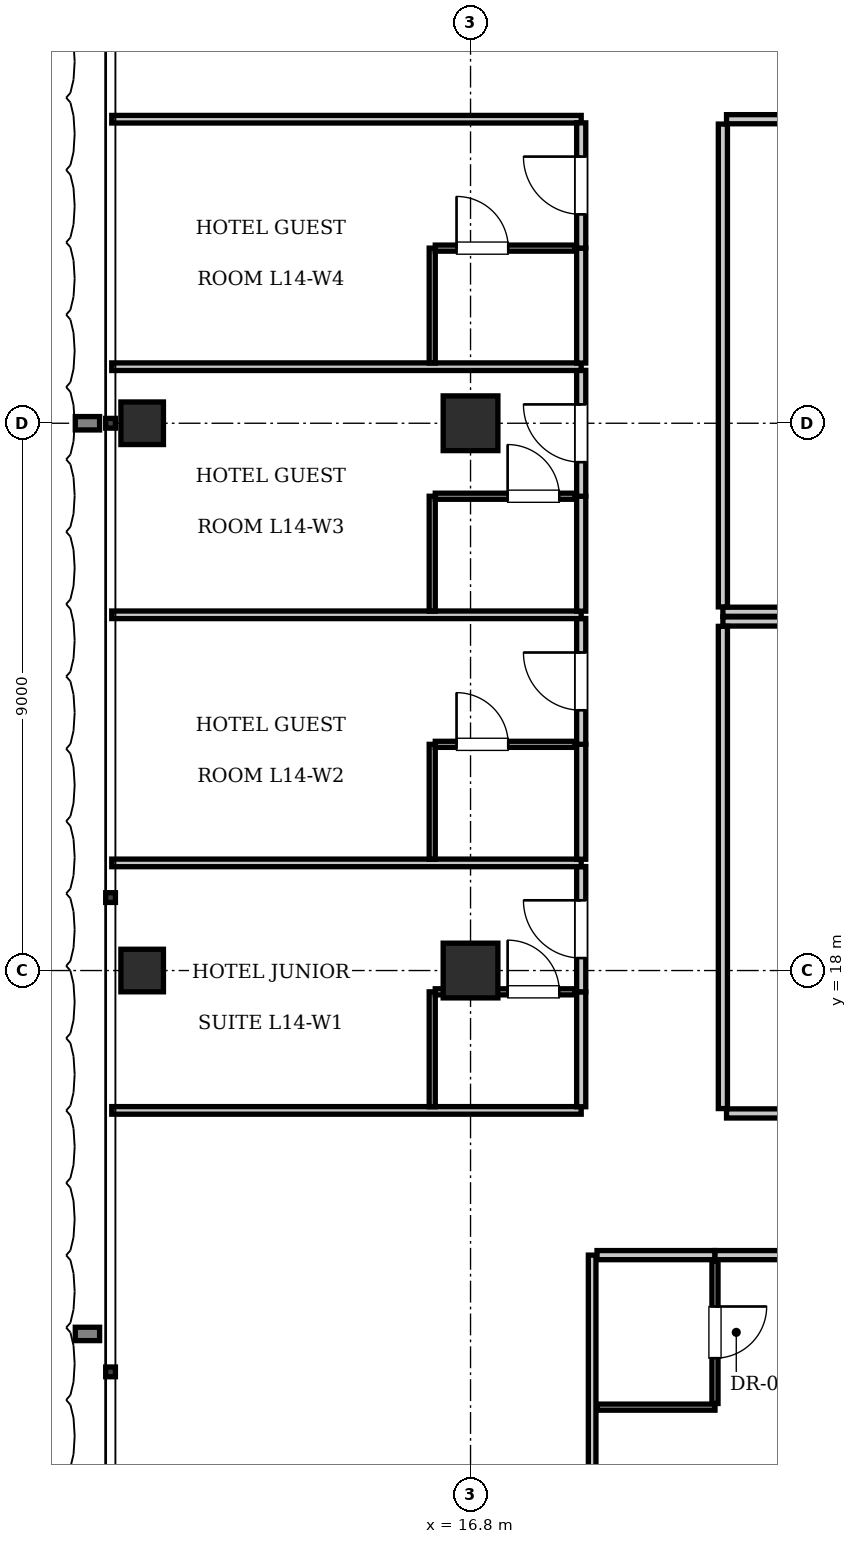
"""IFC4 building model, lengths in metres.
Left out: names, types, materials, properties, quantities, classifications, styles, units other than length and angle.
Written with IfcOpenShell. Run it as: python <this file> out.ifc"""

import sys

from ifc_helpers import new_model, si_unit, direction, frame, frame_2d, origin, origin_2d, place, context, subcontext, project, spatial, rectangle, i_section, extrude, element, fill, save


model = new_model("IFC4")
c1 = context("Model", 3, precision=1e-05, world=origin(), true_north=direction((0.0, 1.0)))
c2 = subcontext(c1, "Body", "Model", "MODEL_VIEW")
j1 = project(units=[si_unit("LENGTHUNIT", "METRE"), si_unit("PLANEANGLEUNIT", "RADIAN")], contexts=[c1])
p1 = place(None, origin())
s1 = spatial("IfcSite", under=j1, at=p1, CompositionType="ELEMENT")
p2 = place(p1, origin())
s2 = spatial("IfcBuilding", under=s1, at=p2, CompositionType="ELEMENT")
p3 = place(p2, frame((0.0, 0.0, 61.6)))
s3 = spatial("IfcBuildingStorey", under=s2, at=p3, CompositionType="ELEMENT", Elevation=61.6)
for number, where, z_axis, x_axis in (
    (1, (16.8, 18.0, 0.0), (0.0, 0.0, 1.0), (1.0, 0.0, 0.0)),
    (2, (16.8, 27.0, 0.0), (0.0, 0.0, 1.0), (1.0, 0.0, 0.0)),
):
    element("IfcColumn", number, at=place(p3, frame(where, z_axis=z_axis, x_axis=x_axis)), inside=s3, PredefinedType="COLUMN", context=c2, shape_type="SweptSolid", body=[
        extrude(rectangle(XDim=0.9, YDim=0.9, at=origin_2d()), origin(), (0.0, 0.0, 1.0), 3.85),
    ])
for number, where, z_axis, x_axis in (
    (3, (11.4, 18.0, 0.0), (0.0, 0.0, 1.0), (1.0, 0.0, 0.0)),
    (4, (11.4, 27.0, 0.0), (0.0, 0.0, 1.0), (1.0, 0.0, 0.0)),
):
    element("IfcColumn", number, at=place(p3, frame(where, z_axis=z_axis, x_axis=x_axis)), inside=s3, PredefinedType="COLUMN", context=c2, shape_type="SweptSolid", body=[
        extrude(i_section(OverallWidth=0.7, OverallDepth=0.7, WebThickness=0.028, FlangeThickness=0.044, at=origin_2d()), origin(), (0.0, 0.0, 1.0), 3.85),
    ])
p4 = place(p3, frame((20.95, 23.9, 0.0), z_axis=(0.0, 0.0, 1.0), x_axis=(1.0, 0.0, 0.0)))
e5 = element("IfcWall", 5, at=p4, inside=s3, PredefinedType="PARTITIONING", context=c2, shape_type="SweptSolid", body=[
    extrude(rectangle(XDim=33.7, YDim=0.15, at=frame_2d((16.85, 0.0))), origin(), (0.0, 0.0, 1.0), 3.61),
])
p5 = place(p3, frame((20.95, 23.98, 0.0), z_axis=(0.0, 0.0, 1.0), x_axis=(0.0, 1.0, 0.0)))
e6 = element("IfcWall", 6, at=p5, inside=s3, PredefinedType="PARTITIONING", context=c2, shape_type="SweptSolid", body=[
    extrude(rectangle(XDim=7.94, YDim=0.15, at=frame_2d((3.97, 0.0))), origin(), (0.0, 0.0, 1.0), 3.255),
])
p6 = place(p3, frame((21.01, 32.0, 0.0), z_axis=(0.0, 0.0, 1.0), x_axis=(1.0, 0.0, 0.0)))
e7 = element("IfcWall", 7, at=p6, inside=s3, PredefinedType="PARTITIONING", context=c2, shape_type="SweptSolid", body=[
    extrude(rectangle(XDim=5.302, YDim=0.15, at=frame_2d((2.651, 0.0))), origin(), (0.0, 0.0, 1.0), 3.61),
])
p7 = place(p6, frame((2.201, 0.0, 0.0)))
e8 = element("IfcOpeningElement", 8, at=p7, cuts=e7, PredefinedType="OPENING", context=c2, shape_type="SweptSolid", body=[
    extrude(rectangle(XDim=0.9, YDim=2.1, at=frame_2d((0.45, 1.05))), frame((0.0, 0.085, 0.0), z_axis=(0.0, -1.0, 0.0), x_axis=(1.0, 0.0, 0.0)), (0.0, 0.0, 1.0), 0.17),
])
p8 = place(p3, frame((20.95, 23.74, 0.0), z_axis=(0.0, 0.0, 1.0), x_axis=(1.0, 0.0, 0.0)))
e9 = element("IfcWall", 9, at=p8, inside=s3, PredefinedType="PARTITIONING", context=c2, shape_type="SweptSolid", body=[
    extrude(rectangle(XDim=33.7, YDim=0.15, at=frame_2d((16.85, 0.0))), origin(), (0.0, 0.0, 1.0), 3.61),
])
p9 = place(p3, frame((20.95, 15.73, 0.0), z_axis=(0.0, 0.0, 1.0), x_axis=(0.0, 1.0, 0.0)))
e10 = element("IfcWall", 10, at=p9, inside=s3, PredefinedType="PARTITIONING", context=c2, shape_type="SweptSolid", body=[
    extrude(rectangle(XDim=7.93, YDim=0.15, at=frame_2d((3.965, 0.0))), origin(), (0.0, 0.0, 1.0), 3.255),
])
p10 = place(p3, frame((21.01, 15.65, 0.0), z_axis=(0.0, 0.0, 1.0), x_axis=(1.0, 0.0, 0.0)))
e11 = element("IfcWall", 11, at=p10, inside=s3, PredefinedType="PARTITIONING", context=c2, shape_type="SweptSolid", body=[
    extrude(rectangle(XDim=7.661, YDim=0.15, at=frame_2d((3.831, 0.0))), origin(), (0.0, 0.0, 1.0), 3.61),
])
p11 = place(p10, frame((3.381, 0.0, 0.0)))
e12 = element("IfcOpeningElement", 12, at=p11, cuts=e11, PredefinedType="OPENING", context=c2, shape_type="SweptSolid", body=[
    extrude(rectangle(XDim=0.9, YDim=2.1, at=frame_2d((0.45, 1.05))), frame((0.0, 0.085, 0.0), z_axis=(0.0, -1.0, 0.0), x_axis=(1.0, 0.0, 0.0)), (0.0, 0.0, 1.0), 0.17),
])
p12 = place(p3, frame((18.8, 0.1, 0.0), z_axis=(0.0, 0.0, 1.0), x_axis=(0.0, 1.0, 0.0)))
e13 = element("IfcWall", 13, at=p12, inside=s3, PredefinedType="PARTITIONING", context=c2, shape_type="SweptSolid", body=[
    extrude(rectangle(XDim=13.22, YDim=0.125, at=frame_2d((6.61, 0.0))), origin(), (0.0, 0.0, 1.0), 3.61),
])
p13 = place(p3, frame((18.88, 13.32, 0.0), z_axis=(0.0, 0.0, 1.0), x_axis=(1.0, 0.0, 0.0)))
e14 = element("IfcWall", 14, at=p13, inside=s3, PredefinedType="PARTITIONING", context=c2, shape_type="SweptSolid", body=[
    extrude(rectangle(XDim=1.94, YDim=0.15, at=frame_2d((0.97, 0.0))), origin(), (0.0, 0.0, 1.0), 3.61),
])
p14 = place(p3, frame((18.88, 10.82, 0.0), z_axis=(0.0, 0.0, 1.0), x_axis=(1.0, 0.0, 0.0)))
e15 = element("IfcWall", 15, at=p14, inside=s3, PredefinedType="PARTITIONING", context=c2, shape_type="SweptSolid", body=[
    extrude(rectangle(XDim=1.94, YDim=0.1, at=frame_2d((0.97, 0.0))), origin(), (0.0, 0.0, 1.0), 3.61),
])
p15 = place(p3, frame((20.82, 10.88, 0.0), z_axis=(0.0, 0.0, 1.0), x_axis=(0.0, 1.0, 0.0)))
e16 = element("IfcWall", 16, at=p15, inside=s3, PredefinedType="PARTITIONING", context=c2, shape_type="SweptSolid", body=[
    extrude(rectangle(XDim=2.34, YDim=0.1, at=frame_2d((1.17, 0.0))), origin(), (0.0, 0.0, 1.0), 3.61),
])
p16 = place(p15, frame((0.745, 0.0, 0.0)))
e17 = element("IfcOpeningElement", 17, at=p16, cuts=e16, PredefinedType="OPENING", context=c2, shape_type="SweptSolid", body=[
    extrude(rectangle(XDim=0.85, YDim=2.1, at=frame_2d((0.425, 1.05))), frame((0.0, 0.06, 0.0), z_axis=(0.0, -1.0, 0.0), x_axis=(1.0, 0.0, 0.0)), (0.0, 0.0, 1.0), 0.12),
])
p17 = place(p3, frame((20.82, 13.32, 0.0), z_axis=(0.0, 0.0, 1.0), x_axis=(1.0, 0.0, 0.0)))
e18 = element("IfcWall", 18, at=p17, inside=s3, PredefinedType="PARTITIONING", context=c2, shape_type="SweptSolid", body=[
    extrude(rectangle(XDim=3.56, YDim=0.15, at=frame_2d((1.78, 0.0))), origin(), (0.0, 0.0, 1.0), 3.61),
])
p18 = place(p17, frame((1.305, 0.0, 0.0)))
e19 = element("IfcOpeningElement", 19, at=p18, cuts=e18, PredefinedType="OPENING", context=c2, shape_type="SweptSolid", body=[
    extrude(rectangle(XDim=0.95, YDim=2.15, at=frame_2d((0.475, 1.075))), frame((0.0, 0.085, 0.0), z_axis=(0.0, -1.0, 0.0), x_axis=(1.0, 0.0, 0.0)), (0.0, 0.0, 1.0), 0.17),
])
for number, where, z_axis, x_axis in (
    (20, (10.9, 15.7, 0.0), (0.0, 0.0, 1.0), (1.0, 0.0, 0.0)),
    (21, (10.9, 32.0, 0.0), (0.0, 0.0, 1.0), (1.0, 0.0, 0.0)),
):
    element("IfcWall", number, at=place(p3, frame(where, z_axis=z_axis, x_axis=x_axis)), inside=s3, PredefinedType="PARTITIONING", context=c2, shape_type="SweptSolid", body=[
        extrude(rectangle(XDim=7.72, YDim=0.125, at=frame_2d((3.86, 0.0))), origin(), (0.0, 0.0, 1.0), 3.61),
    ])
p19 = place(p3, frame((18.62, 15.76, 0.0), z_axis=(0.0, 0.0, 1.0), x_axis=(0.0, 1.0, 0.0)))
e22 = element("IfcWall", 22, at=p19, inside=s3, PredefinedType="PARTITIONING", context=c2, shape_type="SweptSolid", body=[
    extrude(rectangle(XDim=1.89, YDim=0.15, at=frame_2d((0.945, 0.0))), origin(), (0.0, 0.0, 1.0), 3.61),
])
p20 = place(p3, frame((18.62, 17.65, 0.0), z_axis=(0.0, 0.0, 1.0), x_axis=(0.0, 1.0, 0.0)))
e23 = element("IfcWall", 23, at=p20, inside=s3, PredefinedType="PARTITIONING", context=c2, shape_type="SweptSolid", body=[
    extrude(rectangle(XDim=2.06, YDim=0.15, at=frame_2d((1.03, 0.0))), origin(), (0.0, 0.0, 1.0), 3.61),
])
p21 = place(p20, frame((0.555, 0.0, 0.0)))
e24 = element("IfcOpeningElement", 24, at=p21, cuts=e23, PredefinedType="OPENING", context=c2, shape_type="SweptSolid", body=[
    extrude(rectangle(XDim=0.95, YDim=2.15, at=frame_2d((0.475, 1.075))), frame((0.0, 0.085, 0.0), z_axis=(0.0, -1.0, 0.0), x_axis=(1.0, 0.0, 0.0)), (0.0, 0.0, 1.0), 0.17),
])
p22 = place(p3, frame((16.17, 15.76, 0.0), z_axis=(0.0, 0.0, 1.0), x_axis=(0.0, 1.0, 0.0)))
e25 = element("IfcWall", 25, at=p22, inside=s3, PredefinedType="PARTITIONING", context=c2, shape_type="SweptSolid", body=[
    extrude(rectangle(XDim=1.89, YDim=0.1, at=frame_2d((0.945, 0.0))), origin(), (0.0, 0.0, 1.0), 3.61),
])
p23 = place(p3, frame((16.22, 17.65, 0.0), z_axis=(0.0, 0.0, 1.0), x_axis=(1.0, 0.0, 0.0)))
e26 = element("IfcWall", 26, at=p23, inside=s3, PredefinedType="PARTITIONING", context=c2, shape_type="SweptSolid", body=[
    extrude(rectangle(XDim=2.3, YDim=0.1, at=frame_2d((1.15, 0.0))), origin(), (0.0, 0.0, 1.0), 3.61),
])
p24 = place(p23, frame((1.19, 0.0, 0.0)))
e27 = element("IfcOpeningElement", 27, at=p24, cuts=e26, PredefinedType="OPENING", context=c2, shape_type="SweptSolid", body=[
    extrude(rectangle(XDim=0.85, YDim=2.1, at=frame_2d((0.425, 1.05))), frame((0.0, 0.06, 0.0), z_axis=(0.0, -1.0, 0.0), x_axis=(1.0, 0.0, 0.0)), (0.0, 0.0, 1.0), 0.12),
])
p25 = place(p3, frame((10.9, 19.77, 0.0), z_axis=(0.0, 0.0, 1.0), x_axis=(1.0, 0.0, 0.0)))
e28 = element("IfcWall", 28, at=p25, inside=s3, PredefinedType="PARTITIONING", context=c2, shape_type="SweptSolid", body=[
    extrude(rectangle(XDim=7.72, YDim=0.125, at=frame_2d((3.86, 0.0))), origin(), (0.0, 0.0, 1.0), 3.61),
])
p26 = place(p3, frame((18.62, 19.83, 0.0), z_axis=(0.0, 0.0, 1.0), x_axis=(0.0, 1.0, 0.0)))
e29 = element("IfcWall", 29, at=p26, inside=s3, PredefinedType="PARTITIONING", context=c2, shape_type="SweptSolid", body=[
    extrude(rectangle(XDim=1.89, YDim=0.15, at=frame_2d((0.945, 0.0))), origin(), (0.0, 0.0, 1.0), 3.61),
])
p27 = place(p3, frame((18.62, 21.72, 0.0), z_axis=(0.0, 0.0, 1.0), x_axis=(0.0, 1.0, 0.0)))
e30 = element("IfcWall", 30, at=p27, inside=s3, PredefinedType="PARTITIONING", context=c2, shape_type="SweptSolid", body=[
    extrude(rectangle(XDim=2.07, YDim=0.15, at=frame_2d((1.035, 0.0))), origin(), (0.0, 0.0, 1.0), 3.61),
])
p28 = place(p27, frame((0.56, 0.0, 0.0)))
e31 = element("IfcOpeningElement", 31, at=p28, cuts=e30, PredefinedType="OPENING", context=c2, shape_type="SweptSolid", body=[
    extrude(rectangle(XDim=0.95, YDim=2.15, at=frame_2d((0.475, 1.075))), frame((0.0, 0.085, 0.0), z_axis=(0.0, -1.0, 0.0), x_axis=(1.0, 0.0, 0.0)), (0.0, 0.0, 1.0), 0.17),
])
p29 = place(p3, frame((16.17, 19.83, 0.0), z_axis=(0.0, 0.0, 1.0), x_axis=(0.0, 1.0, 0.0)))
e32 = element("IfcWall", 32, at=p29, inside=s3, PredefinedType="PARTITIONING", context=c2, shape_type="SweptSolid", body=[
    extrude(rectangle(XDim=1.89, YDim=0.1, at=frame_2d((0.945, 0.0))), origin(), (0.0, 0.0, 1.0), 3.61),
])
p30 = place(p3, frame((16.22, 21.72, 0.0), z_axis=(0.0, 0.0, 1.0), x_axis=(1.0, 0.0, 0.0)))
e33 = element("IfcWall", 33, at=p30, inside=s3, PredefinedType="PARTITIONING", context=c2, shape_type="SweptSolid", body=[
    extrude(rectangle(XDim=2.3, YDim=0.1, at=frame_2d((1.15, 0.0))), origin(), (0.0, 0.0, 1.0), 3.61),
])
p31 = place(p30, frame((0.35, 0.0, 0.0)))
e34 = element("IfcOpeningElement", 34, at=p31, cuts=e33, PredefinedType="OPENING", context=c2, shape_type="SweptSolid", body=[
    extrude(rectangle(XDim=0.85, YDim=2.1, at=frame_2d((0.425, 1.05))), frame((0.0, 0.06, 0.0), z_axis=(0.0, -1.0, 0.0), x_axis=(1.0, 0.0, 0.0)), (0.0, 0.0, 1.0), 0.12),
])
p32 = place(p3, frame((10.9, 23.85, 0.0), z_axis=(0.0, 0.0, 1.0), x_axis=(1.0, 0.0, 0.0)))
e35 = element("IfcWall", 35, at=p32, inside=s3, PredefinedType="PARTITIONING", context=c2, shape_type="SweptSolid", body=[
    extrude(rectangle(XDim=7.72, YDim=0.125, at=frame_2d((3.86, 0.0))), origin(), (0.0, 0.0, 1.0), 3.61),
])
p33 = place(p3, frame((18.62, 23.91, 0.0), z_axis=(0.0, 0.0, 1.0), x_axis=(0.0, 1.0, 0.0)))
e36 = element("IfcWall", 36, at=p33, inside=s3, PredefinedType="PARTITIONING", context=c2, shape_type="SweptSolid", body=[
    extrude(rectangle(XDim=1.89, YDim=0.15, at=frame_2d((0.945, 0.0))), origin(), (0.0, 0.0, 1.0), 3.61),
])
p34 = place(p3, frame((18.62, 25.8, 0.0), z_axis=(0.0, 0.0, 1.0), x_axis=(0.0, 1.0, 0.0)))
e37 = element("IfcWall", 37, at=p34, inside=s3, PredefinedType="PARTITIONING", context=c2, shape_type="SweptSolid", body=[
    extrude(rectangle(XDim=2.07, YDim=0.15, at=frame_2d((1.035, 0.0))), origin(), (0.0, 0.0, 1.0), 3.61),
])
p35 = place(p34, frame((0.56, 0.0, 0.0)))
e38 = element("IfcOpeningElement", 38, at=p35, cuts=e37, PredefinedType="OPENING", context=c2, shape_type="SweptSolid", body=[
    extrude(rectangle(XDim=0.95, YDim=2.15, at=frame_2d((0.475, 1.075))), frame((0.0, 0.085, 0.0), z_axis=(0.0, -1.0, 0.0), x_axis=(1.0, 0.0, 0.0)), (0.0, 0.0, 1.0), 0.17),
])
p36 = place(p3, frame((16.17, 23.91, 0.0), z_axis=(0.0, 0.0, 1.0), x_axis=(0.0, 1.0, 0.0)))
e39 = element("IfcWall", 39, at=p36, inside=s3, PredefinedType="PARTITIONING", context=c2, shape_type="SweptSolid", body=[
    extrude(rectangle(XDim=1.89, YDim=0.1, at=frame_2d((0.945, 0.0))), origin(), (0.0, 0.0, 1.0), 3.61),
])
p37 = place(p3, frame((16.22, 25.8, 0.0), z_axis=(0.0, 0.0, 1.0), x_axis=(1.0, 0.0, 0.0)))
e40 = element("IfcWall", 40, at=p37, inside=s3, PredefinedType="PARTITIONING", context=c2, shape_type="SweptSolid", body=[
    extrude(rectangle(XDim=2.3, YDim=0.1, at=frame_2d((1.15, 0.0))), origin(), (0.0, 0.0, 1.0), 3.61),
])
p38 = place(p37, frame((1.19, 0.0, 0.0)))
e41 = element("IfcOpeningElement", 41, at=p38, cuts=e40, PredefinedType="OPENING", context=c2, shape_type="SweptSolid", body=[
    extrude(rectangle(XDim=0.85, YDim=2.1, at=frame_2d((0.425, 1.05))), frame((0.0, 0.06, 0.0), z_axis=(0.0, -1.0, 0.0), x_axis=(1.0, 0.0, 0.0)), (0.0, 0.0, 1.0), 0.12),
])
p39 = place(p3, frame((10.9, 27.93, 0.0), z_axis=(0.0, 0.0, 1.0), x_axis=(1.0, 0.0, 0.0)))
e42 = element("IfcWall", 42, at=p39, inside=s3, PredefinedType="PARTITIONING", context=c2, shape_type="SweptSolid", body=[
    extrude(rectangle(XDim=7.72, YDim=0.125, at=frame_2d((3.86, 0.0))), origin(), (0.0, 0.0, 1.0), 3.61),
])
p40 = place(p3, frame((18.62, 27.99, 0.0), z_axis=(0.0, 0.0, 1.0), x_axis=(0.0, 1.0, 0.0)))
e43 = element("IfcWall", 43, at=p40, inside=s3, PredefinedType="PARTITIONING", context=c2, shape_type="SweptSolid", body=[
    extrude(rectangle(XDim=1.89, YDim=0.15, at=frame_2d((0.945, 0.0))), origin(), (0.0, 0.0, 1.0), 3.61),
])
p41 = place(p3, frame((18.62, 29.88, 0.0), z_axis=(0.0, 0.0, 1.0), x_axis=(0.0, 1.0, 0.0)))
e44 = element("IfcWall", 44, at=p41, inside=s3, PredefinedType="PARTITIONING", context=c2, shape_type="SweptSolid", body=[
    extrude(rectangle(XDim=2.06, YDim=0.15, at=frame_2d((1.03, 0.0))), origin(), (0.0, 0.0, 1.0), 3.61),
])
p42 = place(p41, frame((0.555, 0.0, 0.0)))
e45 = element("IfcOpeningElement", 45, at=p42, cuts=e44, PredefinedType="OPENING", context=c2, shape_type="SweptSolid", body=[
    extrude(rectangle(XDim=0.95, YDim=2.15, at=frame_2d((0.475, 1.075))), frame((0.0, 0.085, 0.0), z_axis=(0.0, -1.0, 0.0), x_axis=(1.0, 0.0, 0.0)), (0.0, 0.0, 1.0), 0.17),
])
p43 = place(p3, frame((16.17, 27.99, 0.0), z_axis=(0.0, 0.0, 1.0), x_axis=(0.0, 1.0, 0.0)))
e46 = element("IfcWall", 46, at=p43, inside=s3, PredefinedType="PARTITIONING", context=c2, shape_type="SweptSolid", body=[
    extrude(rectangle(XDim=1.89, YDim=0.1, at=frame_2d((0.945, 0.0))), origin(), (0.0, 0.0, 1.0), 3.61),
])
p44 = place(p3, frame((16.22, 29.88, 0.0), z_axis=(0.0, 0.0, 1.0), x_axis=(1.0, 0.0, 0.0)))
e47 = element("IfcWall", 47, at=p44, inside=s3, PredefinedType="PARTITIONING", context=c2, shape_type="SweptSolid", body=[
    extrude(rectangle(XDim=2.3, YDim=0.1, at=frame_2d((1.15, 0.0))), origin(), (0.0, 0.0, 1.0), 3.61),
])
p45 = place(p44, frame((0.35, 0.0, 0.0)))
e48 = element("IfcOpeningElement", 48, at=p45, cuts=e47, PredefinedType="OPENING", context=c2, shape_type="SweptSolid", body=[
    extrude(rectangle(XDim=0.85, YDim=2.1, at=frame_2d((0.425, 1.05))), frame((0.0, 0.06, 0.0), z_axis=(0.0, -1.0, 0.0), x_axis=(1.0, 0.0, 0.0)), (0.0, 0.0, 1.0), 0.12),
])
p46 = place(p16, frame((0.85, 0.0, 0.0), z_axis=(0.0, 0.0, 1.0), x_axis=(-1.0, 0.0, 0.0)))
e49 = element("IfcDoor", 49, at=p46, inside=s3, OperationType="SINGLE_SWING_LEFT", PredefinedType="DOOR", context=c2, shape_type="SweptSolid", body=[
    extrude(rectangle(XDim=0.85, YDim=2.1, at=frame_2d((0.425, 1.05))), frame((0.0, 0.025, 0.0), z_axis=(0.0, -1.0, 0.0), x_axis=(1.0, 0.0, 0.0)), (0.0, 0.0, 1.0), 0.05),
])
fill(e17, e49)
p47 = place(p24, origin())
e50 = element("IfcDoor", 50, at=p47, inside=s3, OperationType="SINGLE_SWING_LEFT", PredefinedType="DOOR", context=c2, shape_type="SweptSolid", body=[
    extrude(rectangle(XDim=0.85, YDim=2.1, at=frame_2d((0.425, 1.05))), frame((0.0, 0.025, 0.0), z_axis=(0.0, -1.0, 0.0), x_axis=(1.0, 0.0, 0.0)), (0.0, 0.0, 1.0), 0.05),
])
fill(e27, e50)
p48 = place(p21, origin())
e51 = element("IfcDoor", 51, at=p48, inside=s3, OperationType="SINGLE_SWING_RIGHT", PredefinedType="DOOR", context=c2, shape_type="SweptSolid", body=[
    extrude(rectangle(XDim=0.95, YDim=2.15, at=frame_2d((0.475, 1.075))), frame((0.0, 0.025, 0.0), z_axis=(0.0, -1.0, 0.0), x_axis=(1.0, 0.0, 0.0)), (0.0, 0.0, 1.0), 0.05),
])
fill(e24, e51)
p49 = place(p31, origin())
e52 = element("IfcDoor", 52, at=p49, inside=s3, OperationType="SINGLE_SWING_LEFT", PredefinedType="DOOR", context=c2, shape_type="SweptSolid", body=[
    extrude(rectangle(XDim=0.85, YDim=2.1, at=frame_2d((0.425, 1.05))), frame((0.0, 0.025, 0.0), z_axis=(0.0, -1.0, 0.0), x_axis=(1.0, 0.0, 0.0)), (0.0, 0.0, 1.0), 0.05),
])
fill(e34, e52)
p50 = place(p28, origin())
e53 = element("IfcDoor", 53, at=p50, inside=s3, OperationType="SINGLE_SWING_RIGHT", PredefinedType="DOOR", context=c2, shape_type="SweptSolid", body=[
    extrude(rectangle(XDim=0.95, YDim=2.15, at=frame_2d((0.475, 1.075))), frame((0.0, 0.025, 0.0), z_axis=(0.0, -1.0, 0.0), x_axis=(1.0, 0.0, 0.0)), (0.0, 0.0, 1.0), 0.05),
])
fill(e31, e53)
p51 = place(p38, origin())
e54 = element("IfcDoor", 54, at=p51, inside=s3, OperationType="SINGLE_SWING_LEFT", PredefinedType="DOOR", context=c2, shape_type="SweptSolid", body=[
    extrude(rectangle(XDim=0.85, YDim=2.1, at=frame_2d((0.425, 1.05))), frame((0.0, 0.025, 0.0), z_axis=(0.0, -1.0, 0.0), x_axis=(1.0, 0.0, 0.0)), (0.0, 0.0, 1.0), 0.05),
])
fill(e41, e54)
p52 = place(p35, origin())
e55 = element("IfcDoor", 55, at=p52, inside=s3, OperationType="SINGLE_SWING_RIGHT", PredefinedType="DOOR", context=c2, shape_type="SweptSolid", body=[
    extrude(rectangle(XDim=0.95, YDim=2.15, at=frame_2d((0.475, 1.075))), frame((0.0, 0.025, 0.0), z_axis=(0.0, -1.0, 0.0), x_axis=(1.0, 0.0, 0.0)), (0.0, 0.0, 1.0), 0.05),
])
fill(e38, e55)
p53 = place(p45, origin())
e56 = element("IfcDoor", 56, at=p53, inside=s3, OperationType="SINGLE_SWING_LEFT", PredefinedType="DOOR", context=c2, shape_type="SweptSolid", body=[
    extrude(rectangle(XDim=0.85, YDim=2.1, at=frame_2d((0.425, 1.05))), frame((0.0, 0.025, 0.0), z_axis=(0.0, -1.0, 0.0), x_axis=(1.0, 0.0, 0.0)), (0.0, 0.0, 1.0), 0.05),
])
fill(e48, e56)
p54 = place(p42, origin())
e57 = element("IfcDoor", 57, at=p54, inside=s3, OperationType="SINGLE_SWING_RIGHT", PredefinedType="DOOR", context=c2, shape_type="SweptSolid", body=[
    extrude(rectangle(XDim=0.95, YDim=2.15, at=frame_2d((0.475, 1.075))), frame((0.0, 0.025, 0.0), z_axis=(0.0, -1.0, 0.0), x_axis=(1.0, 0.0, 0.0)), (0.0, 0.0, 1.0), 0.05),
])
fill(e45, e57)
save(model, sys.argv[1])
